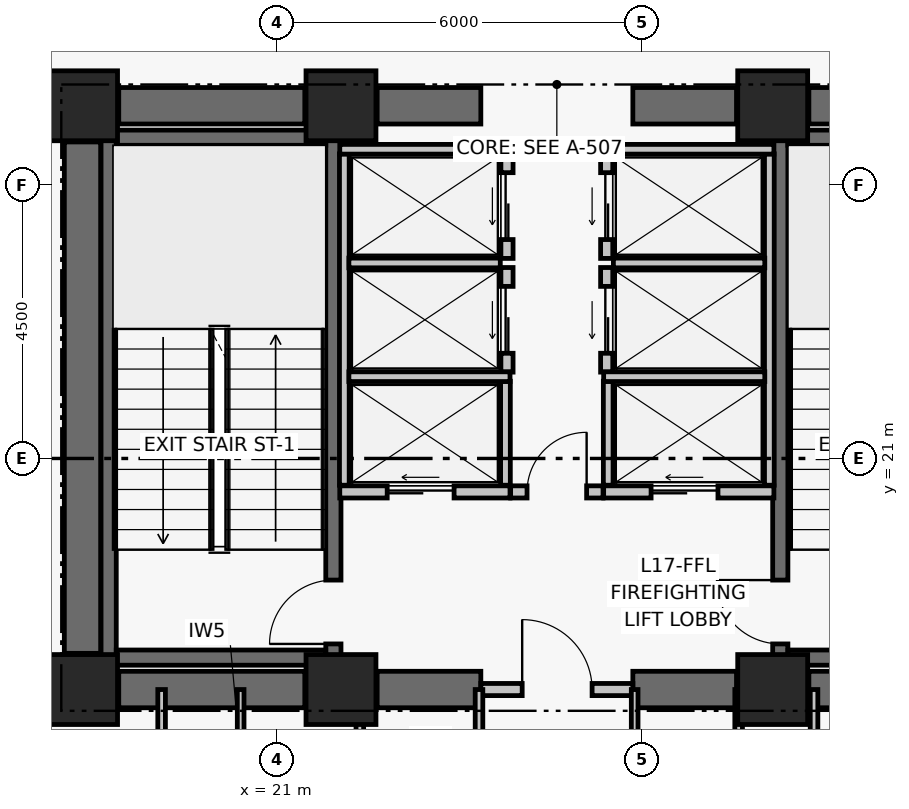
"""IFC4 building model, lengths in metres.
Left out: names, types, materials, properties, quantities, classifications, styles, units other than length and angle.
Written with IfcOpenShell. Run it as: python <this file> out.ifc"""

import sys

from ifc_helpers import new_model, si_unit, direction, frame, frame_2d, origin, origin_2d, place, context, subcontext, project, spatial, rectangle, extrude, element, fill, save


model = new_model("IFC4")
c1 = context("Model", 3, precision=1e-05, world=origin(), true_north=direction((0.0, 1.0)))
c2 = subcontext(c1, "Body", "Model", "MODEL_VIEW")
j1 = project(units=[si_unit("LENGTHUNIT", "METRE"), si_unit("PLANEANGLEUNIT", "RADIAN")], contexts=[c1])
p1 = place(None, origin())
s1 = spatial("IfcSite", under=j1, at=p1, CompositionType="ELEMENT")
p2 = place(p1, origin())
s2 = spatial("IfcBuilding", under=s1, at=p2, CompositionType="ELEMENT")
p3 = place(p2, frame((0.0, 0.0, 72.24)))
s3 = spatial("IfcBuildingStorey", under=s2, at=p3, CompositionType="ELEMENT", Elevation=72.24)
for number, where, z_axis, x_axis in (
    (1, (17.8, 17.2, 0.0), (0.0, 0.0, 1.0), (1.0, 0.0, 0.0)),
    (2, (22.05, 17.2, 0.0), (0.0, 0.0, 1.0), (1.0, 0.0, 0.0)),
    (3, (29.15, 17.2, 0.0), (0.0, 0.0, 1.0), (1.0, 0.0, 0.0)),
    (4, (17.8, 26.8, 0.0), (0.0, 0.0, 1.0), (1.0, 0.0, 0.0)),
    (5, (22.05, 26.8, 0.0), (0.0, 0.0, 1.0), (1.0, 0.0, 0.0)),
    (6, (29.15, 26.8, 0.0), (0.0, 0.0, 1.0), (1.0, 0.0, 0.0)),
):
    element("IfcColumn", number, at=place(p3, frame(where, z_axis=z_axis, x_axis=x_axis)), inside=s3, PredefinedType="COLUMN", context=c2, shape_type="SweptSolid", body=[
        extrude(rectangle(XDim=1.15, YDim=1.15, at=origin_2d()), origin(), (0.0, 0.0, 1.0), 3.72),
    ])
p4 = place(p3, frame((18.395, 17.2, 0.0), z_axis=(0.0, 0.0, 1.0), x_axis=(1.0, 0.0, 0.0)))
e7 = element("IfcWall", 7, at=p4, inside=s3, PredefinedType="SHEAR", context=c2, shape_type="SweptSolid", body=[
    extrude(rectangle(XDim=3.06, YDim=0.6, at=frame_2d((1.53, 0.0))), origin(), (0.0, 0.0, 1.0), 3.47),
])
p5 = place(p3, frame((22.645, 17.2, 0.0), z_axis=(0.0, 0.0, 1.0), x_axis=(1.0, 0.0, 0.0)))
e8 = element("IfcWall", 8, at=p5, inside=s3, PredefinedType="SHEAR", context=c2, shape_type="SweptSolid", body=[
    extrude(rectangle(XDim=1.705, YDim=0.6, at=frame_2d((0.853, 0.0))), origin(), (0.0, 0.0, 1.0), 3.47),
])
p6 = place(p3, frame((26.85, 17.2, 0.0), z_axis=(0.0, 0.0, 1.0), x_axis=(1.0, 0.0, 0.0)))
e9 = element("IfcWall", 9, at=p6, inside=s3, PredefinedType="SHEAR", context=c2, shape_type="SweptSolid", body=[
    extrude(rectangle(XDim=1.705, YDim=0.6, at=frame_2d((0.853, 0.0))), origin(), (0.0, 0.0, 1.0), 3.47),
])
p7 = place(p3, frame((29.745, 17.2, 0.0), z_axis=(0.0, 0.0, 1.0), x_axis=(1.0, 0.0, 0.0)))
e10 = element("IfcWall", 10, at=p7, inside=s3, PredefinedType="SHEAR", context=c2, shape_type="SweptSolid", body=[
    extrude(rectangle(XDim=3.06, YDim=0.6, at=frame_2d((1.53, 0.0))), origin(), (0.0, 0.0, 1.0), 3.47),
])
p8 = place(p3, frame((18.395, 26.8, 0.0), z_axis=(0.0, 0.0, 1.0), x_axis=(1.0, 0.0, 0.0)))
e11 = element("IfcWall", 11, at=p8, inside=s3, PredefinedType="SHEAR", context=c2, shape_type="SweptSolid", body=[
    extrude(rectangle(XDim=3.06, YDim=0.6, at=frame_2d((1.53, 0.0))), origin(), (0.0, 0.0, 1.0), 3.47),
])
p9 = place(p3, frame((22.645, 26.8, 0.0), z_axis=(0.0, 0.0, 1.0), x_axis=(1.0, 0.0, 0.0)))
e12 = element("IfcWall", 12, at=p9, inside=s3, PredefinedType="SHEAR", context=c2, shape_type="SweptSolid", body=[
    extrude(rectangle(XDim=1.705, YDim=0.6, at=frame_2d((0.853, 0.0))), origin(), (0.0, 0.0, 1.0), 3.47),
])
p10 = place(p3, frame((26.85, 26.8, 0.0), z_axis=(0.0, 0.0, 1.0), x_axis=(1.0, 0.0, 0.0)))
e13 = element("IfcWall", 13, at=p10, inside=s3, PredefinedType="SHEAR", context=c2, shape_type="SweptSolid", body=[
    extrude(rectangle(XDim=1.705, YDim=0.6, at=frame_2d((0.853, 0.0))), origin(), (0.0, 0.0, 1.0), 3.47),
])
p11 = place(p3, frame((29.745, 26.8, 0.0), z_axis=(0.0, 0.0, 1.0), x_axis=(1.0, 0.0, 0.0)))
e14 = element("IfcWall", 14, at=p11, inside=s3, PredefinedType="SHEAR", context=c2, shape_type="SweptSolid", body=[
    extrude(rectangle(XDim=3.06, YDim=0.6, at=frame_2d((1.53, 0.0))), origin(), (0.0, 0.0, 1.0), 3.47),
])
p12 = place(p3, frame((17.8, 17.795, 0.0), z_axis=(0.0, 0.0, 1.0), x_axis=(0.0, 1.0, 0.0)))
e15 = element("IfcWall", 15, at=p12, inside=s3, PredefinedType="SHEAR", context=c2, shape_type="SweptSolid", body=[
    extrude(rectangle(XDim=8.41, YDim=0.6, at=frame_2d((4.205, 0.0))), origin(), (0.0, 0.0, 1.0), 3.47),
])
p13 = place(p3, frame((18.229, 17.6, 0.0), z_axis=(0.0, 0.0, 1.0), x_axis=(0.0, 1.0, 0.0)))
e16 = element("IfcWall", 16, at=p13, inside=s3, PredefinedType="SHEAR", context=c2, shape_type="SweptSolid", body=[
    extrude(rectangle(XDim=8.8, YDim=0.25, at=frame_2d((4.4, 0.0))), origin(), (0.0, 0.0, 1.0), 3.47),
])
p14 = place(p3, frame((21.925, 17.6, 0.0), z_axis=(0.0, 0.0, 1.0), x_axis=(0.0, 1.0, 0.0)))
e17 = element("IfcWall", 17, at=p14, inside=s3, PredefinedType="SHEAR", context=c2, shape_type="SweptSolid", body=[
    extrude(rectangle(XDim=8.8, YDim=0.25, at=frame_2d((4.4, 0.0))), origin(), (0.0, 0.0, 1.0), 3.47),
])
p15 = place(p14, frame((0.35, 0.0, 0.0)))
e18 = element("IfcOpeningElement", 18, at=p15, cuts=e17, PredefinedType="OPENING", context=c2, shape_type="SweptSolid", body=[
    extrude(rectangle(XDim=1.05, YDim=2.08, at=frame_2d((0.525, 1.04))), frame((0.0, 0.135, 0.0), z_axis=(0.0, -1.0, 0.0), x_axis=(1.0, 0.0, 0.0)), (0.0, 0.0, 1.0), 0.27),
])
for number, where, z_axis, x_axis in (
    (19, (18.354, 17.725, 0.0), (0.0, 0.0, 1.0), (1.0, 0.0, 0.0)),
    (20, (18.354, 26.275, 0.0), (0.0, 0.0, 1.0), (1.0, 0.0, 0.0)),
):
    element("IfcWall", number, at=place(p3, frame(where, z_axis=z_axis, x_axis=x_axis)), inside=s3, PredefinedType="SHEAR", context=c2, shape_type="SweptSolid", body=[
        extrude(rectangle(XDim=3.446, YDim=0.25, at=frame_2d((1.723, 0.0))), origin(), (0.0, 0.0, 1.0), 3.47),
    ])
p16 = place(p3, frame((29.275, 17.6, 0.0), z_axis=(0.0, 0.0, 1.0), x_axis=(0.0, 1.0, 0.0)))
e21 = element("IfcWall", 21, at=p16, inside=s3, PredefinedType="SHEAR", context=c2, shape_type="SweptSolid", body=[
    extrude(rectangle(XDim=8.8, YDim=0.25, at=frame_2d((4.4, 0.0))), origin(), (0.0, 0.0, 1.0), 3.47),
])
p17 = place(p16, frame((0.35, 0.0, 0.0)))
e22 = element("IfcOpeningElement", 22, at=p17, cuts=e21, PredefinedType="OPENING", context=c2, shape_type="SweptSolid", body=[
    extrude(rectangle(XDim=1.05, YDim=2.08, at=frame_2d((0.525, 1.04))), frame((0.0, 0.135, 0.0), z_axis=(0.0, -1.0, 0.0), x_axis=(1.0, 0.0, 0.0)), (0.0, 0.0, 1.0), 0.27),
])
for number, where, z_axis, x_axis in (
    (23, (29.4, 17.725, 0.0), (0.0, 0.0, 1.0), (1.0, 0.0, 0.0)),
    (24, (29.4, 26.275, 0.0), (0.0, 0.0, 1.0), (1.0, 0.0, 0.0)),
):
    element("IfcWall", number, at=place(p3, frame(where, z_axis=z_axis, x_axis=x_axis)), inside=s3, PredefinedType="SHEAR", context=c2, shape_type="SweptSolid", body=[
        extrude(rectangle(XDim=3.446, YDim=0.25, at=frame_2d((1.723, 0.0))), origin(), (0.0, 0.0, 1.0), 3.47),
    ])
p18 = place(p3, frame((24.35, 17.2, 0.0), z_axis=(0.0, 0.0, 1.0), x_axis=(1.0, 0.0, 0.0)))
e25 = element("IfcWall", 25, at=p18, inside=s3, PredefinedType="PARTITIONING", context=c2, shape_type="SweptSolid", body=[
    extrude(rectangle(XDim=2.5, YDim=0.2, at=frame_2d((1.25, 0.0))), origin(), (0.0, 0.0, 1.0), 2.6),
])
p19 = place(p18, frame((0.68, 0.0, 0.0)))
e26 = element("IfcOpeningElement", 26, at=p19, cuts=e25, PredefinedType="OPENING", context=c2, shape_type="SweptSolid", body=[
    extrude(rectangle(XDim=1.15, YDim=2.08, at=frame_2d((0.575, 1.04))), frame((0.0, 0.11, 0.0), z_axis=(0.0, -1.0, 0.0), x_axis=(1.0, 0.0, 0.0)), (0.0, 0.0, 1.0), 0.22),
])
p20 = place(p3, frame((24.84, 20.45, 0.0), z_axis=(0.0, 0.0, 1.0), x_axis=(1.0, 0.0, 0.0)))
e27 = element("IfcWall", 27, at=p20, inside=s3, PredefinedType="PARTITIONING", context=c2, shape_type="SweptSolid", body=[
    extrude(rectangle(XDim=1.52, YDim=0.2, at=frame_2d((0.76, 0.0))), origin(), (0.0, 0.0, 1.0), 3.47),
])
p21 = place(p20, frame((0.27, 0.0, 0.0)))
e28 = element("IfcOpeningElement", 28, at=p21, cuts=e27, PredefinedType="OPENING", context=c2, shape_type="SweptSolid", body=[
    extrude(rectangle(XDim=0.98, YDim=2.06, at=frame_2d((0.49, 1.03))), frame((0.0, 0.11, 0.0), z_axis=(0.0, -1.0, 0.0), x_axis=(1.0, 0.0, 0.0)), (0.0, 0.0, 1.0), 0.22),
])
p22 = place(p3, frame((22.03, 20.45, 0.0), z_axis=(0.0, 0.0, 1.0), x_axis=(1.0, 0.0, 0.0)))
e29 = element("IfcWall", 29, at=p22, inside=s3, PredefinedType="PARTITIONING", context=c2, shape_type="SweptSolid", body=[
    extrude(rectangle(XDim=2.8, YDim=0.2, at=frame_2d((1.4, 0.0))), origin(), (0.0, 0.0, 1.0), 3.47),
])
p23 = place(p22, frame((0.78, 0.0, 0.0)))
e30 = element("IfcOpeningElement", 30, at=p23, cuts=e29, PredefinedType="OPENING", context=c2, shape_type="SweptSolid", body=[
    extrude(rectangle(XDim=1.1, YDim=2.08, at=frame_2d((0.55, 1.04))), frame((0.0, 0.11, 0.0), z_axis=(0.0, -1.0, 0.0), x_axis=(1.0, 0.0, 0.0)), (0.0, 0.0, 1.0), 0.22),
])
p24 = place(p3, frame((26.37, 20.45, 0.0), z_axis=(0.0, 0.0, 1.0), x_axis=(1.0, 0.0, 0.0)))
e31 = element("IfcWall", 31, at=p24, inside=s3, PredefinedType="PARTITIONING", context=c2, shape_type="SweptSolid", body=[
    extrude(rectangle(XDim=2.8, YDim=0.2, at=frame_2d((1.4, 0.0))), origin(), (0.0, 0.0, 1.0), 3.47),
])
p25 = place(p24, frame((0.78, 0.0, 0.0)))
e32 = element("IfcOpeningElement", 32, at=p25, cuts=e31, PredefinedType="OPENING", context=c2, shape_type="SweptSolid", body=[
    extrude(rectangle(XDim=1.1, YDim=2.08, at=frame_2d((0.55, 1.04))), frame((0.0, 0.11, 0.0), z_axis=(0.0, -1.0, 0.0), x_axis=(1.0, 0.0, 0.0)), (0.0, 0.0, 1.0), 0.22),
])
p26 = place(p3, frame((24.78, 22.42, 0.0), z_axis=(0.0, 0.0, 1.0), x_axis=(0.0, 1.0, 0.0)))
e33 = element("IfcWall", 33, at=p26, inside=s3, PredefinedType="PARTITIONING", context=c2, shape_type="SweptSolid", body=[
    extrude(rectangle(XDim=1.72, YDim=0.2, at=frame_2d((0.86, 0.0))), origin(), (0.0, 0.0, 1.0), 3.47),
])
p27 = place(p26, frame((0.31, 0.0, 0.0)))
e34 = element("IfcOpeningElement", 34, at=p27, cuts=e33, PredefinedType="OPENING", context=c2, shape_type="SweptSolid", body=[
    extrude(rectangle(XDim=1.1, YDim=2.08, at=frame_2d((0.55, 1.04))), frame((0.0, 0.11, 0.0), z_axis=(0.0, -1.0, 0.0), x_axis=(1.0, 0.0, 0.0)), (0.0, 0.0, 1.0), 0.22),
])
p28 = place(p3, frame((24.78, 24.29, 0.0), z_axis=(0.0, 0.0, 1.0), x_axis=(0.0, 1.0, 0.0)))
e35 = element("IfcWall", 35, at=p28, inside=s3, PredefinedType="PARTITIONING", context=c2, shape_type="SweptSolid", body=[
    extrude(rectangle(XDim=1.72, YDim=0.2, at=frame_2d((0.86, 0.0))), origin(), (0.0, 0.0, 1.0), 3.47),
])
p29 = place(p28, frame((0.31, 0.0, 0.0)))
e36 = element("IfcOpeningElement", 36, at=p29, cuts=e35, PredefinedType="OPENING", context=c2, shape_type="SweptSolid", body=[
    extrude(rectangle(XDim=1.1, YDim=2.08, at=frame_2d((0.55, 1.04))), frame((0.0, 0.11, 0.0), z_axis=(0.0, -1.0, 0.0), x_axis=(1.0, 0.0, 0.0)), (0.0, 0.0, 1.0), 0.22),
])
p30 = place(p3, frame((26.42, 22.42, 0.0), z_axis=(0.0, 0.0, 1.0), x_axis=(0.0, 1.0, 0.0)))
e37 = element("IfcWall", 37, at=p30, inside=s3, PredefinedType="PARTITIONING", context=c2, shape_type="SweptSolid", body=[
    extrude(rectangle(XDim=1.72, YDim=0.2, at=frame_2d((0.86, 0.0))), origin(), (0.0, 0.0, 1.0), 3.47),
])
p31 = place(p30, frame((0.31, 0.0, 0.0)))
e38 = element("IfcOpeningElement", 38, at=p31, cuts=e37, PredefinedType="OPENING", context=c2, shape_type="SweptSolid", body=[
    extrude(rectangle(XDim=1.1, YDim=2.08, at=frame_2d((0.55, 1.04))), frame((0.0, 0.11, 0.0), z_axis=(0.0, -1.0, 0.0), x_axis=(1.0, 0.0, 0.0)), (0.0, 0.0, 1.0), 0.22),
])
p32 = place(p3, frame((26.42, 24.29, 0.0), z_axis=(0.0, 0.0, 1.0), x_axis=(0.0, 1.0, 0.0)))
e39 = element("IfcWall", 39, at=p32, inside=s3, PredefinedType="PARTITIONING", context=c2, shape_type="SweptSolid", body=[
    extrude(rectangle(XDim=1.72, YDim=0.2, at=frame_2d((0.86, 0.0))), origin(), (0.0, 0.0, 1.0), 3.47),
])
p33 = place(p32, frame((0.31, 0.0, 0.0)))
e40 = element("IfcOpeningElement", 40, at=p33, cuts=e39, PredefinedType="OPENING", context=c2, shape_type="SweptSolid", body=[
    extrude(rectangle(XDim=1.1, YDim=2.08, at=frame_2d((0.55, 1.04))), frame((0.0, 0.11, 0.0), z_axis=(0.0, -1.0, 0.0), x_axis=(1.0, 0.0, 0.0)), (0.0, 0.0, 1.0), 0.22),
])
p34 = place(p3, frame((22.105, 20.56, 0.0), z_axis=(0.0, 0.0, 1.0), x_axis=(0.0, 1.0, 0.0)))
e41 = element("IfcWall", 41, at=p34, inside=s3, PredefinedType="PARTITIONING", context=c2, shape_type="SweptSolid", body=[
    extrude(rectangle(XDim=5.45, YDim=0.16, at=frame_2d((2.725, 0.0))), origin(), (0.0, 0.0, 1.0), 3.47),
])
p35 = place(p3, frame((24.755, 20.56, 0.0), z_axis=(0.0, 0.0, 1.0), x_axis=(0.0, 1.0, 0.0)))
e42 = element("IfcWall", 42, at=p35, inside=s3, PredefinedType="PARTITIONING", context=c2, shape_type="SweptSolid", body=[
    extrude(rectangle(XDim=1.71, YDim=0.16, at=frame_2d((0.855, 0.0))), origin(), (0.0, 0.0, 1.0), 3.47),
])
p36 = place(p3, frame((22.18, 22.345, 0.0), z_axis=(0.0, 0.0, 1.0), x_axis=(1.0, 0.0, 0.0)))
e43 = element("IfcWall", 43, at=p36, inside=s3, PredefinedType="PARTITIONING", context=c2, shape_type="SweptSolid", body=[
    extrude(rectangle(XDim=2.65, YDim=0.16, at=frame_2d((1.325, 0.0))), origin(), (0.0, 0.0, 1.0), 3.47),
])
p37 = place(p3, frame((22.18, 24.215, 0.0), z_axis=(0.0, 0.0, 1.0), x_axis=(1.0, 0.0, 0.0)))
e44 = element("IfcWall", 44, at=p37, inside=s3, PredefinedType="PARTITIONING", context=c2, shape_type="SweptSolid", body=[
    extrude(rectangle(XDim=2.49, YDim=0.16, at=frame_2d((1.245, 0.0))), origin(), (0.0, 0.0, 1.0), 3.47),
])
p38 = place(p3, frame((22.03, 26.085, 0.0), z_axis=(0.0, 0.0, 1.0), x_axis=(1.0, 0.0, 0.0)))
e45 = element("IfcWall", 45, at=p38, inside=s3, PredefinedType="PARTITIONING", context=c2, shape_type="SweptSolid", body=[
    extrude(rectangle(XDim=2.83, YDim=0.16, at=frame_2d((1.415, 0.0))), origin(), (0.0, 0.0, 1.0), 3.47),
])
p39 = place(p3, frame((29.095, 20.56, 0.0), z_axis=(0.0, 0.0, 1.0), x_axis=(0.0, 1.0, 0.0)))
e46 = element("IfcWall", 46, at=p39, inside=s3, PredefinedType="PARTITIONING", context=c2, shape_type="SweptSolid", body=[
    extrude(rectangle(XDim=5.45, YDim=0.16, at=frame_2d((2.725, 0.0))), origin(), (0.0, 0.0, 1.0), 3.47),
])
p40 = place(p3, frame((26.445, 20.56, 0.0), z_axis=(0.0, 0.0, 1.0), x_axis=(0.0, 1.0, 0.0)))
e47 = element("IfcWall", 47, at=p40, inside=s3, PredefinedType="PARTITIONING", context=c2, shape_type="SweptSolid", body=[
    extrude(rectangle(XDim=1.71, YDim=0.16, at=frame_2d((0.855, 0.0))), origin(), (0.0, 0.0, 1.0), 3.47),
])
p41 = place(p3, frame((26.37, 22.345, 0.0), z_axis=(0.0, 0.0, 1.0), x_axis=(1.0, 0.0, 0.0)))
e48 = element("IfcWall", 48, at=p41, inside=s3, PredefinedType="PARTITIONING", context=c2, shape_type="SweptSolid", body=[
    extrude(rectangle(XDim=2.65, YDim=0.16, at=frame_2d((1.325, 0.0))), origin(), (0.0, 0.0, 1.0), 3.47),
])
p42 = place(p3, frame((26.53, 24.215, 0.0), z_axis=(0.0, 0.0, 1.0), x_axis=(1.0, 0.0, 0.0)))
e49 = element("IfcWall", 49, at=p42, inside=s3, PredefinedType="PARTITIONING", context=c2, shape_type="SweptSolid", body=[
    extrude(rectangle(XDim=2.49, YDim=0.16, at=frame_2d((1.245, 0.0))), origin(), (0.0, 0.0, 1.0), 3.47),
])
p43 = place(p3, frame((26.34, 26.085, 0.0), z_axis=(0.0, 0.0, 1.0), x_axis=(1.0, 0.0, 0.0)))
e50 = element("IfcWall", 50, at=p43, inside=s3, PredefinedType="PARTITIONING", context=c2, shape_type="SweptSolid", body=[
    extrude(rectangle(XDim=2.83, YDim=0.16, at=frame_2d((1.415, 0.0))), origin(), (0.0, 0.0, 1.0), 3.47),
])
p44 = place(p3, frame((19.1, 14.95, 0.0), z_axis=(0.0, 0.0, 1.0), x_axis=(0.0, 1.0, 0.0)))
e51 = element("IfcWall", 51, at=p44, inside=s3, PredefinedType="PARTITIONING", context=c2, shape_type="SweptSolid", body=[
    extrude(rectangle(XDim=2.25, YDim=0.125, at=frame_2d((1.125, 0.0))), origin(), (0.0, 0.0, 1.0), 2.6),
])
p45 = place(p3, frame((20.4, 14.95, 0.0), z_axis=(0.0, 0.0, 1.0), x_axis=(0.0, 1.0, 0.0)))
e52 = element("IfcWall", 52, at=p45, inside=s3, PredefinedType="PARTITIONING", context=c2, shape_type="SweptSolid", body=[
    extrude(rectangle(XDim=2.25, YDim=0.11, at=frame_2d((1.125, 0.0))), origin(), (0.0, 0.0, 1.0), 2.6),
])
for number, where, z_axis, x_axis in (
    (53, (22.36, 14.95, 0.0), (0.0, 0.0, 1.0), (0.0, 1.0, 0.0)),
    (54, (24.32, 14.95, 0.0), (0.0, 0.0, 1.0), (0.0, 1.0, 0.0)),
):
    element("IfcWall", number, at=place(p3, frame(where, z_axis=z_axis, x_axis=x_axis)), inside=s3, PredefinedType="PARTITIONING", context=c2, shape_type="SweptSolid", body=[
        extrude(rectangle(XDim=2.25, YDim=0.125, at=frame_2d((1.125, 0.0))), origin(), (0.0, 0.0, 1.0), 2.6),
    ])
p46 = place(p3, frame((26.88, 14.95, 0.0), z_axis=(0.0, 0.0, 1.0), x_axis=(0.0, 1.0, 0.0)))
e55 = element("IfcWall", 55, at=p46, inside=s3, PredefinedType="PARTITIONING", context=c2, shape_type="SweptSolid", body=[
    extrude(rectangle(XDim=2.25, YDim=0.11, at=frame_2d((1.125, 0.0))), origin(), (0.0, 0.0, 1.0), 2.6),
])
for number, where, z_axis, x_axis in (
    (56, (28.59, 14.95, 0.0), (0.0, 0.0, 1.0), (0.0, 1.0, 0.0)),
    (57, (29.83, 14.95, 0.0), (0.0, 0.0, 1.0), (0.0, 1.0, 0.0)),
):
    element("IfcWall", number, at=place(p3, frame(where, z_axis=z_axis, x_axis=x_axis)), inside=s3, PredefinedType="PARTITIONING", context=c2, shape_type="SweptSolid", body=[
        extrude(rectangle(XDim=2.25, YDim=0.125, at=frame_2d((1.125, 0.0))), origin(), (0.0, 0.0, 1.0), 2.6),
    ])
p47 = place(p15, origin())
e58 = element("IfcDoor", 58, at=p47, inside=s3, OperationType="SINGLE_SWING_LEFT", PredefinedType="DOOR", context=c2, shape_type="SweptSolid", body=[
    extrude(rectangle(XDim=1.05, YDim=2.08, at=frame_2d((0.525, 1.04))), frame((0.0, 0.025, 0.0), z_axis=(0.0, -1.0, 0.0), x_axis=(1.0, 0.0, 0.0)), (0.0, 0.0, 1.0), 0.05),
])
fill(e18, e58)
p48 = place(p17, origin())
e59 = element("IfcDoor", 59, at=p48, inside=s3, OperationType="SINGLE_SWING_RIGHT", PredefinedType="DOOR", context=c2, shape_type="SweptSolid", body=[
    extrude(rectangle(XDim=1.05, YDim=2.08, at=frame_2d((0.525, 1.04))), frame((0.0, 0.025, 0.0), z_axis=(0.0, -1.0, 0.0), x_axis=(1.0, 0.0, 0.0)), (0.0, 0.0, 1.0), 0.05),
])
fill(e22, e59)
p49 = place(p19, origin())
e60 = element("IfcDoor", 60, at=p49, inside=s3, OperationType="SINGLE_SWING_LEFT", PredefinedType="DOOR", context=c2, shape_type="SweptSolid", body=[
    extrude(rectangle(XDim=1.15, YDim=2.08, at=frame_2d((0.575, 1.04))), frame((0.0, 0.025, 0.0), z_axis=(0.0, -1.0, 0.0), x_axis=(1.0, 0.0, 0.0)), (0.0, 0.0, 1.0), 0.05),
])
fill(e26, e60)
p50 = place(p21, origin())
e61 = element("IfcDoor", 61, at=p50, inside=s3, OperationType="SINGLE_SWING_RIGHT", PredefinedType="DOOR", context=c2, shape_type="SweptSolid", body=[
    extrude(rectangle(XDim=0.98, YDim=2.06, at=frame_2d((0.49, 1.03))), frame((0.0, 0.025, 0.0), z_axis=(0.0, -1.0, 0.0), x_axis=(1.0, 0.0, 0.0)), (0.0, 0.0, 1.0), 0.05),
])
fill(e28, e61)
p51 = place(p23, origin())
e62 = element("IfcDoor", 62, at=p51, inside=s3, OperationType="DOUBLE_DOOR_SLIDING", PredefinedType="DOOR", context=c2, shape_type="SweptSolid", body=[
    extrude(rectangle(XDim=1.1, YDim=2.08, at=frame_2d((0.55, 1.04))), frame((0.0, 0.025, 0.0), z_axis=(0.0, -1.0, 0.0), x_axis=(1.0, 0.0, 0.0)), (0.0, 0.0, 1.0), 0.05),
])
fill(e30, e62)
p52 = place(p25, origin())
e63 = element("IfcDoor", 63, at=p52, inside=s3, OperationType="DOUBLE_DOOR_SLIDING", PredefinedType="DOOR", context=c2, shape_type="SweptSolid", body=[
    extrude(rectangle(XDim=1.1, YDim=2.08, at=frame_2d((0.55, 1.04))), frame((0.0, 0.025, 0.0), z_axis=(0.0, -1.0, 0.0), x_axis=(1.0, 0.0, 0.0)), (0.0, 0.0, 1.0), 0.05),
])
fill(e32, e63)
p53 = place(p27, origin())
e64 = element("IfcDoor", 64, at=p53, inside=s3, OperationType="DOUBLE_DOOR_SLIDING", PredefinedType="DOOR", context=c2, shape_type="SweptSolid", body=[
    extrude(rectangle(XDim=1.1, YDim=2.08, at=frame_2d((0.55, 1.04))), frame((0.0, 0.025, 0.0), z_axis=(0.0, -1.0, 0.0), x_axis=(1.0, 0.0, 0.0)), (0.0, 0.0, 1.0), 0.05),
])
fill(e34, e64)
p54 = place(p29, origin())
e65 = element("IfcDoor", 65, at=p54, inside=s3, OperationType="DOUBLE_DOOR_SLIDING", PredefinedType="DOOR", context=c2, shape_type="SweptSolid", body=[
    extrude(rectangle(XDim=1.1, YDim=2.08, at=frame_2d((0.55, 1.04))), frame((0.0, 0.025, 0.0), z_axis=(0.0, -1.0, 0.0), x_axis=(1.0, 0.0, 0.0)), (0.0, 0.0, 1.0), 0.05),
])
fill(e36, e65)
p55 = place(p31, origin())
e66 = element("IfcDoor", 66, at=p55, inside=s3, OperationType="DOUBLE_DOOR_SLIDING", PredefinedType="DOOR", context=c2, shape_type="SweptSolid", body=[
    extrude(rectangle(XDim=1.1, YDim=2.08, at=frame_2d((0.55, 1.04))), frame((0.0, 0.025, 0.0), z_axis=(0.0, -1.0, 0.0), x_axis=(1.0, 0.0, 0.0)), (0.0, 0.0, 1.0), 0.05),
])
fill(e38, e66)
p56 = place(p33, origin())
e67 = element("IfcDoor", 67, at=p56, inside=s3, OperationType="DOUBLE_DOOR_SLIDING", PredefinedType="DOOR", context=c2, shape_type="SweptSolid", body=[
    extrude(rectangle(XDim=1.1, YDim=2.08, at=frame_2d((0.55, 1.04))), frame((0.0, 0.025, 0.0), z_axis=(0.0, -1.0, 0.0), x_axis=(1.0, 0.0, 0.0)), (0.0, 0.0, 1.0), 0.05),
])
fill(e40, e67)
save(model, sys.argv[1])
